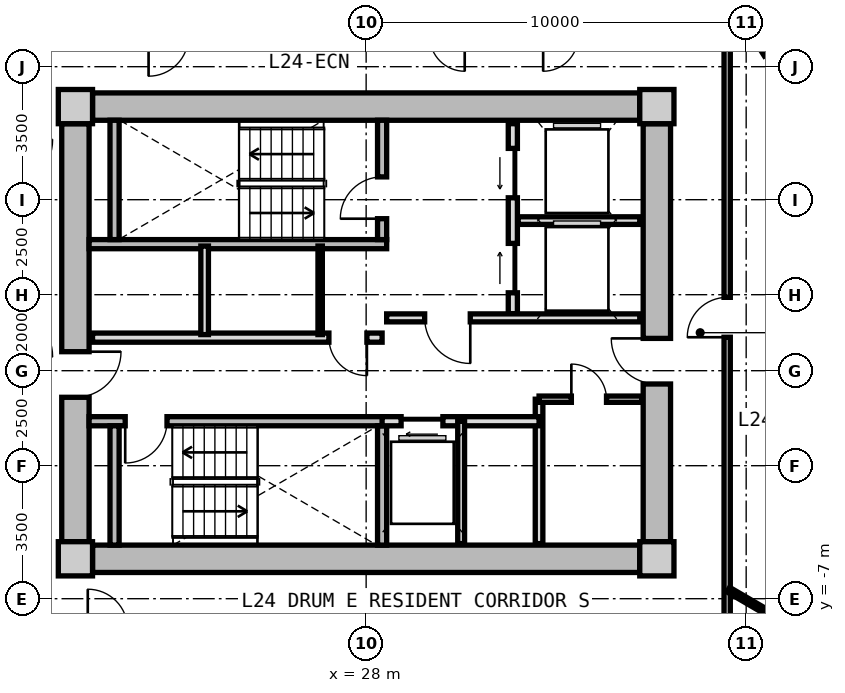
"""IFC4 building model, lengths in metres.
Left out: names, types, materials, properties, quantities, classifications, styles, units other than length and angle.
Written with IfcOpenShell. Run it as: python <this file> out.ifc"""

import sys

from ifc_helpers import new_model, si_unit, direction, frame, frame_2d, origin, origin_2d, place, context, subcontext, project, spatial, rectangle, extrude, source, transform, mapped, element, fill, save


model = new_model("IFC4")
c1 = context("Model", 3, precision=1e-05, world=origin(), true_north=direction((0.0, 1.0)))
c2 = subcontext(c1, "Body", "Model", "MODEL_VIEW")
j1 = project(units=[si_unit("LENGTHUNIT", "METRE"), si_unit("PLANEANGLEUNIT", "RADIAN")], contexts=[c1])
p1 = place(None, origin())
s1 = spatial("IfcSite", under=j1, at=p1, CompositionType="ELEMENT")
p2 = place(p1, origin())
s2 = spatial("IfcBuilding", under=s1, at=p2, CompositionType="ELEMENT")
p3 = place(p2, frame((0.0, 0.0, 81.0)))
s3 = spatial("IfcBuildingStorey", under=s2, at=p3, CompositionType="ELEMENT", Elevation=81.0)
m1 = source(origin(), c2, "Body", "SweptSolid", [
    extrude(rectangle(XDim=0.9, YDim=0.9, at=origin_2d()), origin(), (0.0, 0.0, 1.0), 3.05),
])
for number, where, z_axis, x_axis in (
    (1, (20.35, -5.95, 0.0), (0.0, 0.0, 1.0), (1.0, 0.0, 0.0)),
    (2, (35.65, -5.95, 0.0), (0.0, 0.0, 1.0), (1.0, 0.0, 0.0)),
    (3, (35.65, 5.95, 0.0), (0.0, 0.0, 1.0), (1.0, 0.0, 0.0)),
    (4, (20.35, 5.95, 0.0), (0.0, 0.0, 1.0), (1.0, 0.0, 0.0)),
):
    element("IfcColumn", number, at=place(p3, frame(where, z_axis=z_axis, x_axis=x_axis)), inside=s3, PredefinedType="COLUMN", context=c2, shape_type="MappedRepresentation", body=[
        mapped(m1, transform((0.0, 0.0, 0.0), x_axis=(1.0, 0.0, 0.0), y_axis=(0.0, 1.0, 0.0), z_axis=(0.0, 0.0, 1.0), scale=1.0)),
    ])
m2 = source(origin(), c2, "Body", "SweptSolid", [
    extrude(rectangle(XDim=14.4, YDim=0.72, at=frame_2d((7.2, 0.0))), origin(), (0.0, 0.0, 1.0), 2.79),
])
for number, where, z_axis, x_axis in (
    (5, (20.8, 5.95, 0.0), (0.0, 0.0, 1.0), (1.0, 0.0, 0.0)),
    (6, (35.2, -5.95, 0.0), (0.0, 0.0, 1.0), (-1.0, 0.0, 0.0)),
):
    element("IfcWall", number, at=place(p3, frame(where, z_axis=z_axis, x_axis=x_axis)), inside=s3, PredefinedType="SHEAR", context=c2, shape_type="MappedRepresentation", body=[
        mapped(m2, transform((0.0, 0.0, 0.0), x_axis=(1.0, 0.0, 0.0), y_axis=(0.0, 1.0, 0.0), z_axis=(0.0, 0.0, 1.0), scale=1.0)),
    ])
m3 = source(origin(), c2, "Body", "SweptSolid", [
    extrude(rectangle(XDim=11.0, YDim=0.72, at=frame_2d((5.5, 0.0))), origin(), (0.0, 0.0, 1.0), 2.79),
])
p4 = place(p3, frame((20.35, -5.5, 0.0), z_axis=(0.0, 0.0, 1.0), x_axis=(0.0, 1.0, 0.0)))
e7 = element("IfcWall", 7, at=p4, inside=s3, PredefinedType="SHEAR", context=c2, shape_type="MappedRepresentation", body=[
    mapped(m3, transform((0.0, 0.0, 0.0), x_axis=(1.0, 0.0, 0.0), y_axis=(0.0, 1.0, 0.0), z_axis=(0.0, 0.0, 1.0), scale=1.0)),
])
p5 = place(p4, frame((3.8, 0.0, 0.0)))
e8 = element("IfcOpeningElement", 8, at=p5, cuts=e7, PredefinedType="OPENING", context=c2, shape_type="SweptSolid", body=[
    extrude(rectangle(XDim=1.2, YDim=2.15, at=frame_2d((0.6, 1.075))), frame((0.0, 0.37, 0.0), z_axis=(0.0, -1.0, 0.0), x_axis=(1.0, 0.0, 0.0)), (0.0, 0.0, 1.0), 0.74),
])
p6 = place(p3, frame((35.65, 5.5, 0.0), z_axis=(0.0, 0.0, 1.0), x_axis=(0.0, -1.0, 0.0)))
e9 = element("IfcWall", 9, at=p6, inside=s3, PredefinedType="SHEAR", context=c2, shape_type="MappedRepresentation", body=[
    mapped(m3, transform((0.0, 0.0, 0.0), x_axis=(1.0, 0.0, 0.0), y_axis=(0.0, 1.0, 0.0), z_axis=(0.0, 0.0, 1.0), scale=1.0)),
])
p7 = place(p6, frame((5.65, 0.0, 0.0)))
e10 = element("IfcOpeningElement", 10, at=p7, cuts=e9, PredefinedType="OPENING", context=c2, shape_type="SweptSolid", body=[
    extrude(rectangle(XDim=1.2, YDim=2.15, at=frame_2d((0.6, 1.075))), frame((0.0, 0.37, 0.0), z_axis=(0.0, -1.0, 0.0), x_axis=(1.0, 0.0, 0.0)), (0.0, 0.0, 1.0), 0.74),
])
m4 = source(origin(), c2, "Body", "SweptSolid", [
    extrude(rectangle(XDim=7.83, YDim=0.24, at=frame_2d((3.915, 0.0))), origin(), (0.0, 0.0, 1.0), 2.79),
])
p8 = place(p3, frame((20.71, 2.33, 0.0), z_axis=(0.0, 0.0, 1.0), x_axis=(1.0, 0.0, 0.0)))
e11 = element("IfcWall", 11, at=p8, inside=s3, PredefinedType="PARTITIONING", context=c2, shape_type="MappedRepresentation", body=[
    mapped(m4, transform((0.0, 0.0, 0.0), x_axis=(1.0, 0.0, 0.0), y_axis=(0.0, 1.0, 0.0), z_axis=(0.0, 0.0, 1.0), scale=1.0)),
])
m5 = source(origin(), c2, "Body", "SweptSolid", [
    extrude(rectangle(XDim=3.14, YDim=0.24, at=frame_2d((1.57, 0.0))), origin(), (0.0, 0.0, 1.0), 2.79),
])
p9 = place(p3, frame((21.38, 2.45, 0.0), z_axis=(0.0, 0.0, 1.0), x_axis=(0.0, 1.0, 0.0)))
e12 = element("IfcWall", 12, at=p9, inside=s3, PredefinedType="PARTITIONING", context=c2, shape_type="MappedRepresentation", body=[
    mapped(m5, transform((0.0, 0.0, 0.0), x_axis=(1.0, 0.0, 0.0), y_axis=(0.0, 1.0, 0.0), z_axis=(0.0, 0.0, 1.0), scale=1.0)),
])
p10 = place(p3, frame((28.42, 2.45, 0.0), z_axis=(0.0, 0.0, 1.0), x_axis=(0.0, 1.0, 0.0)))
e13 = element("IfcWall", 13, at=p10, inside=s3, PredefinedType="PARTITIONING", context=c2, shape_type="MappedRepresentation", body=[
    mapped(m5, transform((0.0, 0.0, 0.0), x_axis=(1.0, 0.0, 0.0), y_axis=(0.0, 1.0, 0.0), z_axis=(0.0, 0.0, 1.0), scale=1.0)),
])
p11 = place(p10, frame((0.55, 0.0, 0.0)))
e14 = element("IfcOpeningElement", 14, at=p11, cuts=e13, PredefinedType="OPENING", context=c2, shape_type="SweptSolid", body=[
    extrude(rectangle(XDim=1.1, YDim=2.15, at=frame_2d((0.55, 1.075))), frame((0.0, 0.13, 0.0), z_axis=(0.0, -1.0, 0.0), x_axis=(1.0, 0.0, 0.0)), (0.0, 0.0, 1.0), 0.26),
])
p12 = place(p3, frame((20.71, -2.33, 0.0), z_axis=(0.0, 0.0, 1.0), x_axis=(1.0, 0.0, 0.0)))
e15 = element("IfcWall", 15, at=p12, inside=s3, PredefinedType="PARTITIONING", context=c2, shape_type="MappedRepresentation", body=[
    mapped(m4, transform((0.0, 0.0, 0.0), x_axis=(1.0, 0.0, 0.0), y_axis=(0.0, 1.0, 0.0), z_axis=(0.0, 0.0, 1.0), scale=1.0)),
])
p13 = place(p12, frame((0.95, 0.0, 0.0)))
e16 = element("IfcOpeningElement", 16, at=p13, cuts=e15, PredefinedType="OPENING", context=c2, shape_type="SweptSolid", body=[
    extrude(rectangle(XDim=1.1, YDim=2.15, at=frame_2d((0.55, 1.075))), frame((0.0, 0.13, 0.0), z_axis=(0.0, -1.0, 0.0), x_axis=(1.0, 0.0, 0.0)), (0.0, 0.0, 1.0), 0.26),
])
for number, where, z_axis, x_axis in (
    (17, (21.38, -5.59, 0.0), (0.0, 0.0, 1.0), (0.0, 1.0, 0.0)),
    (18, (28.42, -5.59, 0.0), (0.0, 0.0, 1.0), (0.0, 1.0, 0.0)),
):
    element("IfcWall", number, at=place(p3, frame(where, z_axis=z_axis, x_axis=x_axis)), inside=s3, PredefinedType="PARTITIONING", context=c2, shape_type="MappedRepresentation", body=[
        mapped(m5, transform((0.0, 0.0, 0.0), x_axis=(1.0, 0.0, 0.0), y_axis=(0.0, 1.0, 0.0), z_axis=(0.0, 0.0, 1.0), scale=1.0)),
    ])
m6 = source(origin(), c2, "Body", "SweptSolid", [
    extrude(rectangle(XDim=5.0, YDim=0.24, at=frame_2d((2.5, 0.0))), origin(), (0.0, 0.0, 1.0), 2.775),
])
p14 = place(p3, frame((31.86, 0.5, 0.0), z_axis=(0.0, 0.0, 1.0), x_axis=(0.0, 1.0, 0.0)))
e19 = element("IfcWall", 19, at=p14, inside=s3, PredefinedType="PARTITIONING", context=c2, shape_type="MappedRepresentation", body=[
    mapped(m6, transform((0.0, 0.0, 0.0), x_axis=(1.0, 0.0, 0.0), y_axis=(0.0, 1.0, 0.0), z_axis=(0.0, 0.0, 1.0), scale=1.0)),
])
p15 = place(p14, frame((3.05, 0.0, 0.0)))
e20 = element("IfcOpeningElement", 20, at=p15, cuts=e19, PredefinedType="OPENING", context=c2, shape_type="SweptSolid", body=[
    extrude(rectangle(XDim=1.3, YDim=2.2, at=frame_2d((0.65, 1.1))), frame((0.0, 0.13, 0.0), z_axis=(0.0, -1.0, 0.0), x_axis=(1.0, 0.0, 0.0)), (0.0, 0.0, 1.0), 0.26),
])
p16 = place(p14, frame((0.55, 0.0, 0.0)))
e21 = element("IfcOpeningElement", 21, at=p16, cuts=e19, PredefinedType="OPENING", context=c2, shape_type="SweptSolid", body=[
    extrude(rectangle(XDim=1.3, YDim=2.2, at=frame_2d((0.65, 1.1))), frame((0.0, 0.13, 0.0), z_axis=(0.0, -1.0, 0.0), x_axis=(1.0, 0.0, 0.0)), (0.0, 0.0, 1.0), 0.26),
])
m7 = source(origin(), c2, "Body", "SweptSolid", [
    extrude(rectangle(XDim=3.2, YDim=0.2, at=frame_2d((1.6, 0.0))), origin(), (0.0, 0.0, 1.0), 2.775),
])
p17 = place(p3, frame((32.0, 2.95, 0.0), z_axis=(0.0, 0.0, 1.0), x_axis=(1.0, 0.0, 0.0)))
e22 = element("IfcWall", 22, at=p17, inside=s3, PredefinedType="PARTITIONING", context=c2, shape_type="MappedRepresentation", body=[
    mapped(m7, transform((0.0, 0.0, 0.0), x_axis=(1.0, 0.0, 0.0), y_axis=(0.0, 1.0, 0.0), z_axis=(0.0, 0.0, 1.0), scale=1.0)),
])
m8 = source(origin(), c2, "Body", "SweptSolid", [
    extrude(rectangle(XDim=6.66, YDim=0.21, at=frame_2d((3.33, 0.0))), origin(), (0.0, 0.0, 1.0), 2.775),
])
p18 = place(p3, frame((28.54, 0.39, 0.0), z_axis=(0.0, 0.0, 1.0), x_axis=(1.0, 0.0, 0.0)))
e23 = element("IfcWall", 23, at=p18, inside=s3, PredefinedType="PARTITIONING", context=c2, shape_type="MappedRepresentation", body=[
    mapped(m8, transform((0.0, 0.0, 0.0), x_axis=(1.0, 0.0, 0.0), y_axis=(0.0, 1.0, 0.0), z_axis=(0.0, 0.0, 1.0), scale=1.0)),
])
p19 = place(p18, frame((1.0, 0.0, 0.0)))
e24 = element("IfcOpeningElement", 24, at=p19, cuts=e23, PredefinedType="OPENING", context=c2, shape_type="SweptSolid", body=[
    extrude(rectangle(XDim=1.2, YDim=2.15, at=frame_2d((0.6, 1.075))), frame((0.0, 0.115, 0.0), z_axis=(0.0, -1.0, 0.0), x_axis=(1.0, 0.0, 0.0)), (0.0, 0.0, 1.0), 0.23),
])
m9 = source(origin(), c2, "Body", "SweptSolid", [
    extrude(rectangle(XDim=7.62, YDim=0.24, at=frame_2d((3.81, 0.0))), origin(), (0.0, 0.0, 1.0), 2.775),
])
p20 = place(p3, frame((20.8, -0.13, 0.0), z_axis=(0.0, 0.0, 1.0), x_axis=(1.0, 0.0, 0.0)))
e25 = element("IfcWall", 25, at=p20, inside=s3, PredefinedType="PARTITIONING", context=c2, shape_type="MappedRepresentation", body=[
    mapped(m9, transform((0.0, 0.0, 0.0), x_axis=(1.0, 0.0, 0.0), y_axis=(0.0, 1.0, 0.0), z_axis=(0.0, 0.0, 1.0), scale=1.0)),
])
p21 = place(p20, frame((6.22, 0.0, 0.0)))
e26 = element("IfcOpeningElement", 26, at=p21, cuts=e25, PredefinedType="OPENING", context=c2, shape_type="SweptSolid", body=[
    extrude(rectangle(XDim=1.0, YDim=2.1, at=frame_2d((0.5, 1.05))), frame((0.0, 0.13, 0.0), z_axis=(0.0, -1.0, 0.0), x_axis=(1.0, 0.0, 0.0)), (0.0, 0.0, 1.0), 0.26),
])
m10 = source(origin(), c2, "Body", "SweptSolid", [
    extrude(rectangle(XDim=2.33, YDim=0.115, at=frame_2d((1.165, 0.0))), origin(), (0.0, 0.0, 1.0), 2.775),
])
p22 = place(p3, frame((26.79, -0.05, 0.0), z_axis=(0.0, 0.0, 1.0), x_axis=(0.0, 1.0, 0.0)))
e27 = element("IfcWall", 27, at=p22, inside=s3, PredefinedType="PARTITIONING", context=c2, shape_type="MappedRepresentation", body=[
    mapped(m10, transform((0.0, 0.0, 0.0), x_axis=(1.0, 0.0, 0.0), y_axis=(0.0, 1.0, 0.0), z_axis=(0.0, 0.0, 1.0), scale=1.0)),
])
m11 = source(origin(), c2, "Body", "SweptSolid", [
    extrude(rectangle(XDim=2.33, YDim=0.2, at=frame_2d((1.165, 0.0))), origin(), (0.0, 0.0, 1.0), 2.775),
])
p23 = place(p3, frame((23.75, -0.05, 0.0), z_axis=(0.0, 0.0, 1.0), x_axis=(0.0, 1.0, 0.0)))
e28 = element("IfcWall", 28, at=p23, inside=s3, PredefinedType="PARTITIONING", context=c2, shape_type="MappedRepresentation", body=[
    mapped(m11, transform((0.0, 0.0, 0.0), x_axis=(1.0, 0.0, 0.0), y_axis=(0.0, 1.0, 0.0), z_axis=(0.0, 0.0, 1.0), scale=1.0)),
])
m12 = source(origin(), c2, "Body", "SweptSolid", [
    extrude(rectangle(XDim=3.8, YDim=0.2, at=frame_2d((1.9, 0.0))), origin(), (0.0, 0.0, 1.0), 2.775),
])
p24 = place(p3, frame((32.55, -5.55, 0.0), z_axis=(0.0, 0.0, 1.0), x_axis=(0.0, 1.0, 0.0)))
e29 = element("IfcWall", 29, at=p24, inside=s3, PredefinedType="PARTITIONING", context=c2, shape_type="MappedRepresentation", body=[
    mapped(m12, transform((0.0, 0.0, 0.0), x_axis=(1.0, 0.0, 0.0), y_axis=(0.0, 1.0, 0.0), z_axis=(0.0, 0.0, 1.0), scale=1.0)),
])
m13 = source(origin(), c2, "Body", "SweptSolid", [
    extrude(rectangle(XDim=4.13, YDim=0.24, at=frame_2d((2.065, 0.0))), origin(), (0.0, 0.0, 1.0), 2.775),
])
p25 = place(p3, frame((28.42, -2.33, 0.0), z_axis=(0.0, 0.0, 1.0), x_axis=(1.0, 0.0, 0.0)))
e30 = element("IfcWall", 30, at=p25, inside=s3, PredefinedType="PARTITIONING", context=c2, shape_type="MappedRepresentation", body=[
    mapped(m13, transform((0.0, 0.0, 0.0), x_axis=(1.0, 0.0, 0.0), y_axis=(0.0, 1.0, 0.0), z_axis=(0.0, 0.0, 1.0), scale=1.0)),
])
p26 = place(p25, frame((0.5, 0.0, 0.0)))
e31 = element("IfcOpeningElement", 31, at=p26, cuts=e30, PredefinedType="OPENING", context=c2, shape_type="SweptSolid", body=[
    extrude(rectangle(XDim=1.1, YDim=2.2, at=frame_2d((0.55, 1.1))), frame((0.0, 0.13, 0.0), z_axis=(0.0, -1.0, 0.0), x_axis=(1.0, 0.0, 0.0)), (0.0, 0.0, 1.0), 0.26),
])
m14 = source(origin(), c2, "Body", "SweptSolid", [
    extrude(rectangle(XDim=3.22, YDim=0.18, at=frame_2d((1.61, 0.0))), origin(), (0.0, 0.0, 1.0), 2.775),
])
p27 = place(p3, frame((30.5, -5.55, 0.0), z_axis=(0.0, 0.0, 1.0), x_axis=(0.0, 1.0, 0.0)))
e32 = element("IfcWall", 32, at=p27, inside=s3, PredefinedType="PARTITIONING", context=c2, shape_type="MappedRepresentation", body=[
    mapped(m14, transform((0.0, 0.0, 0.0), x_axis=(1.0, 0.0, 0.0), y_axis=(0.0, 1.0, 0.0), z_axis=(0.0, 0.0, 1.0), scale=1.0)),
])
m15 = source(origin(), c2, "Body", "SweptSolid", [
    extrude(rectangle(XDim=2.7, YDim=0.165, at=frame_2d((1.35, 0.0))), origin(), (0.0, 0.0, 1.0), 2.775),
])
p28 = place(p3, frame((32.55, -1.75, 0.0), z_axis=(0.0, 0.0, 1.0), x_axis=(1.0, 0.0, 0.0)))
e33 = element("IfcWall", 33, at=p28, inside=s3, PredefinedType="PARTITIONING", context=c2, shape_type="MappedRepresentation", body=[
    mapped(m15, transform((0.0, 0.0, 0.0), x_axis=(1.0, 0.0, 0.0), y_axis=(0.0, 1.0, 0.0), z_axis=(0.0, 0.0, 1.0), scale=1.0)),
])
p29 = place(p28, frame((0.85, 0.0, 0.0)))
e34 = element("IfcOpeningElement", 34, at=p29, cuts=e33, PredefinedType="OPENING", context=c2, shape_type="SweptSolid", body=[
    extrude(rectangle(XDim=0.925, YDim=2.1, at=frame_2d((0.462, 1.05))), frame((0.0, 0.093, 0.0), z_axis=(0.0, -1.0, 0.0), x_axis=(1.0, 0.0, 0.0)), (0.0, 0.0, 1.0), 0.185),
])
m16 = source(origin(), c2, "Body", "SweptSolid", [
    extrude(rectangle(XDim=15.6, YDim=0.165, at=frame_2d((7.8, 0.0))), origin(), (0.0, 0.0, 1.0), 2.775),
])
p30 = place(p3, frame((37.5, 7.8, 0.0), z_axis=(0.0, 0.0, 1.0), x_axis=(0.0, -1.0, 0.0)))
e35 = element("IfcWall", 35, at=p30, inside=s3, PredefinedType="PARTITIONING", context=c2, shape_type="MappedRepresentation", body=[
    mapped(m16, transform((0.0, 0.0, 0.0), x_axis=(1.0, 0.0, 0.0), y_axis=(0.0, 1.0, 0.0), z_axis=(0.0, 0.0, 1.0), scale=1.0)),
])
p31 = place(p30, frame((6.87, 0.0, 0.0)))
e36 = element("IfcOpeningElement", 36, at=p31, cuts=e35, PredefinedType="OPENING", context=c2, shape_type="SweptSolid", body=[
    extrude(rectangle(XDim=1.05, YDim=2.15, at=frame_2d((0.525, 1.075))), frame((0.0, 0.093, 0.0), z_axis=(0.0, -1.0, 0.0), x_axis=(1.0, 0.0, 0.0)), (0.0, 0.0, 1.0), 0.185),
])
m17 = source(origin(), c2, "Body", "SweptSolid", [
    extrude(rectangle(XDim=7.555, YDim=0.115, at=frame_2d((3.777, 0.0))), origin(), (0.0, 0.0, 1.0), 2.775),
])
p32 = place(p3, frame((40.8, 3.718, 0.0), z_axis=(0.0, 0.0, 1.0), x_axis=(-0.534546095992, 0.845139320621, 0.0)))
e37 = element("IfcWall", 37, at=p32, inside=s3, PredefinedType="PARTITIONING", context=c2, shape_type="MappedRepresentation", body=[
    mapped(m17, transform((0.0, 0.0, 0.0), x_axis=(1.0, 0.0, 0.0), y_axis=(0.0, 1.0, 0.0), z_axis=(0.0, 0.0, 1.0), scale=1.0)),
])
p33 = place(p32, frame((3.302, 0.0, 0.0)))
e38 = element("IfcOpeningElement", 38, at=p33, cuts=e37, PredefinedType="OPENING", context=c2, shape_type="SweptSolid", body=[
    extrude(rectangle(XDim=0.95, YDim=2.1, at=frame_2d((0.475, 1.05))), frame((0.0, 0.067, 0.0), z_axis=(0.0, -1.0, 0.0), x_axis=(1.0, 0.0, 0.0)), (0.0, 0.0, 1.0), 0.135),
])
m18 = source(origin(), c2, "Body", "SweptSolid", [
    extrude(rectangle(XDim=1.407, YDim=0.14, at=frame_2d((0.704, 0.0))), origin(), (0.0, 0.0, 1.0), 2.775),
])
p34 = place(p3, frame((37.53, -6.762, 0.0), z_axis=(0.0, 0.0, 1.0), x_axis=(0.863539718977, -0.504280828258, 0.0)))
e39 = element("IfcWall", 39, at=p34, inside=s3, PredefinedType="PARTITIONING", context=c2, shape_type="MappedRepresentation", body=[
    mapped(m18, transform((0.0, 0.0, 0.0), x_axis=(1.0, 0.0, 0.0), y_axis=(0.0, 1.0, 0.0), z_axis=(0.0, 0.0, 1.0), scale=1.0)),
])
m19 = source(origin(), c2, "Body", "SweptSolid", [
    extrude(rectangle(XDim=1.1, YDim=2.15, at=frame_2d((0.55, 1.075))), frame((0.0, 0.025, 0.0), z_axis=(0.0, -1.0, 0.0), x_axis=(1.0, 0.0, 0.0)), (0.0, 0.0, 1.0), 0.05),
])
p35 = place(p11, origin())
e40 = element("IfcDoor", 40, at=p35, inside=s3, OperationType="SINGLE_SWING_LEFT", PredefinedType="DOOR", context=c2, shape_type="MappedRepresentation", body=[
    mapped(m19, transform((0.0, 0.0, 0.0), x_axis=(1.0, 0.0, 0.0), y_axis=(0.0, 1.0, 0.0), z_axis=(0.0, 0.0, 1.0), scale=1.0)),
])
fill(e14, e40)
p36 = place(p13, frame((1.1, 0.0, 0.0), z_axis=(0.0, 0.0, 1.0), x_axis=(-1.0, 0.0, 0.0)))
e41 = element("IfcDoor", 41, at=p36, inside=s3, OperationType="SINGLE_SWING_RIGHT", PredefinedType="DOOR", context=c2, shape_type="MappedRepresentation", body=[
    mapped(m19, transform((0.0, 0.0, 0.0), x_axis=(1.0, 0.0, 0.0), y_axis=(0.0, 1.0, 0.0), z_axis=(0.0, 0.0, 1.0), scale=1.0)),
])
fill(e16, e41)
m20 = source(origin(), c2, "Body", "SweptSolid", [
    extrude(rectangle(XDim=1.3, YDim=2.2, at=frame_2d((0.65, 1.1))), frame((0.0, 0.025, 0.0), z_axis=(0.0, -1.0, 0.0), x_axis=(1.0, 0.0, 0.0)), (0.0, 0.0, 1.0), 0.05),
])
p37 = place(p15, origin())
e42 = element("IfcDoor", 42, at=p37, inside=s3, OperationType="SLIDING_TO_LEFT", PredefinedType="DOOR", context=c2, shape_type="MappedRepresentation", body=[
    mapped(m20, transform((0.0, 0.0, 0.0), x_axis=(1.0, 0.0, 0.0), y_axis=(0.0, 1.0, 0.0), z_axis=(0.0, 0.0, 1.0), scale=1.0)),
])
fill(e20, e42)
p38 = place(p16, origin())
e43 = element("IfcDoor", 43, at=p38, inside=s3, OperationType="SLIDING_TO_RIGHT", PredefinedType="DOOR", context=c2, shape_type="MappedRepresentation", body=[
    mapped(m20, transform((0.0, 0.0, 0.0), x_axis=(1.0, 0.0, 0.0), y_axis=(0.0, 1.0, 0.0), z_axis=(0.0, 0.0, 1.0), scale=1.0)),
])
fill(e21, e43)
m21 = source(origin(), c2, "Body", "SweptSolid", [
    extrude(rectangle(XDim=1.2, YDim=2.15, at=frame_2d((0.6, 1.075))), frame((0.0, 0.025, 0.0), z_axis=(0.0, -1.0, 0.0), x_axis=(1.0, 0.0, 0.0)), (0.0, 0.0, 1.0), 0.05),
])
p39 = place(p19, frame((1.2, 0.0, 0.0), z_axis=(0.0, 0.0, 1.0), x_axis=(-1.0, 0.0, 0.0)))
e44 = element("IfcDoor", 44, at=p39, inside=s3, OperationType="SINGLE_SWING_LEFT", PredefinedType="DOOR", context=c2, shape_type="MappedRepresentation", body=[
    mapped(m21, transform((0.0, 0.0, 0.0), x_axis=(1.0, 0.0, 0.0), y_axis=(0.0, 1.0, 0.0), z_axis=(0.0, 0.0, 1.0), scale=1.0)),
])
fill(e24, e44)
p40 = place(p5, frame((1.2, 0.0, 0.0), z_axis=(0.0, 0.0, 1.0), x_axis=(-1.0, 0.0, 0.0)))
e45 = element("IfcDoor", 45, at=p40, inside=s3, OperationType="SINGLE_SWING_LEFT", PredefinedType="DOOR", context=c2, shape_type="MappedRepresentation", body=[
    mapped(m21, transform((0.0, 0.0, 0.0), x_axis=(1.0, 0.0, 0.0), y_axis=(0.0, 1.0, 0.0), z_axis=(0.0, 0.0, 1.0), scale=1.0)),
])
fill(e8, e45)
p41 = place(p7, frame((1.2, 0.0, 0.0), z_axis=(0.0, 0.0, 1.0), x_axis=(-1.0, 0.0, 0.0)))
e46 = element("IfcDoor", 46, at=p41, inside=s3, OperationType="SINGLE_SWING_RIGHT", PredefinedType="DOOR", context=c2, shape_type="MappedRepresentation", body=[
    mapped(m21, transform((0.0, 0.0, 0.0), x_axis=(1.0, 0.0, 0.0), y_axis=(0.0, 1.0, 0.0), z_axis=(0.0, 0.0, 1.0), scale=1.0)),
])
fill(e10, e46)
m22 = source(origin(), c2, "Body", "SweptSolid", [
    extrude(rectangle(XDim=1.0, YDim=2.1, at=frame_2d((0.5, 1.05))), frame((0.0, 0.025, 0.0), z_axis=(0.0, -1.0, 0.0), x_axis=(1.0, 0.0, 0.0)), (0.0, 0.0, 1.0), 0.05),
])
p42 = place(p21, frame((1.0, 0.0, 0.0), z_axis=(0.0, 0.0, 1.0), x_axis=(-1.0, 0.0, 0.0)))
e47 = element("IfcDoor", 47, at=p42, inside=s3, OperationType="SINGLE_SWING_LEFT", PredefinedType="DOOR", context=c2, shape_type="MappedRepresentation", body=[
    mapped(m22, transform((0.0, 0.0, 0.0), x_axis=(1.0, 0.0, 0.0), y_axis=(0.0, 1.0, 0.0), z_axis=(0.0, 0.0, 1.0), scale=1.0)),
])
fill(e26, e47)
m23 = source(origin(), c2, "Body", "SweptSolid", [
    extrude(rectangle(XDim=1.1, YDim=2.2, at=frame_2d((0.55, 1.1))), frame((0.0, 0.025, 0.0), z_axis=(0.0, -1.0, 0.0), x_axis=(1.0, 0.0, 0.0)), (0.0, 0.0, 1.0), 0.05),
])
p43 = place(p26, frame((1.1, 0.0, 0.0), z_axis=(0.0, 0.0, 1.0), x_axis=(-1.0, 0.0, 0.0)))
e48 = element("IfcDoor", 48, at=p43, inside=s3, OperationType="SLIDING_TO_LEFT", PredefinedType="DOOR", context=c2, shape_type="MappedRepresentation", body=[
    mapped(m23, transform((0.0, 0.0, 0.0), x_axis=(1.0, 0.0, 0.0), y_axis=(0.0, 1.0, 0.0), z_axis=(0.0, 0.0, 1.0), scale=1.0)),
])
fill(e31, e48)
m24 = source(origin(), c2, "Body", "SweptSolid", [
    extrude(rectangle(XDim=0.925, YDim=2.1, at=frame_2d((0.462, 1.05))), frame((0.0, 0.025, 0.0), z_axis=(0.0, -1.0, 0.0), x_axis=(1.0, 0.0, 0.0)), (0.0, 0.0, 1.0), 0.05),
])
p44 = place(p29, origin())
e49 = element("IfcDoor", 49, at=p44, inside=s3, OperationType="SINGLE_SWING_LEFT", PredefinedType="DOOR", context=c2, shape_type="MappedRepresentation", body=[
    mapped(m24, transform((0.0, 0.0, 0.0), x_axis=(1.0, 0.0, 0.0), y_axis=(0.0, 1.0, 0.0), z_axis=(0.0, 0.0, 1.0), scale=1.0)),
])
fill(e34, e49)
m25 = source(origin(), c2, "Body", "SweptSolid", [
    extrude(rectangle(XDim=1.05, YDim=2.15, at=frame_2d((0.525, 1.075))), frame((0.0, 0.025, 0.0), z_axis=(0.0, -1.0, 0.0), x_axis=(1.0, 0.0, 0.0)), (0.0, 0.0, 1.0), 0.05),
])
p45 = place(p31, frame((1.05, 0.0, 0.0), z_axis=(0.0, 0.0, 1.0), x_axis=(-1.0, 0.0, 0.0)))
e50 = element("IfcDoor", 50, at=p45, inside=s3, OperationType="SINGLE_SWING_LEFT", PredefinedType="DOOR", context=c2, shape_type="MappedRepresentation", body=[
    mapped(m25, transform((0.0, 0.0, 0.0), x_axis=(1.0, 0.0, 0.0), y_axis=(0.0, 1.0, 0.0), z_axis=(0.0, 0.0, 1.0), scale=1.0)),
])
fill(e36, e50)
save(model, sys.argv[1])
